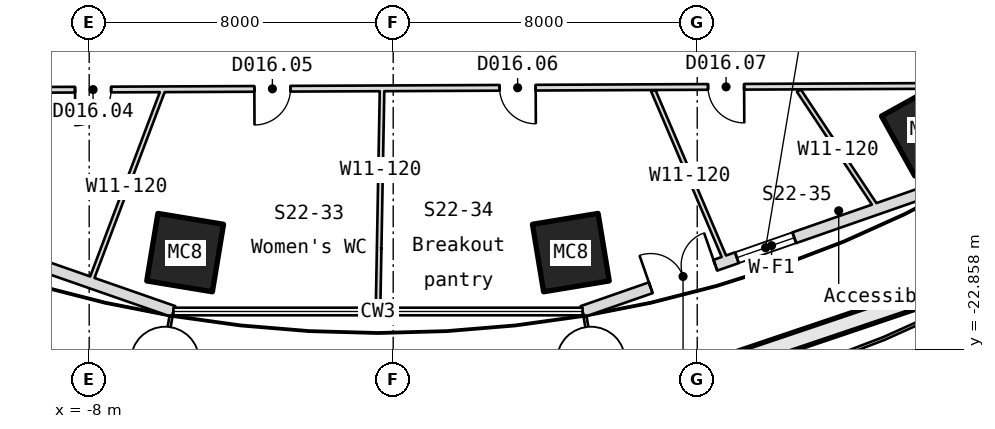
"""IFC4 building model, lengths in metres.
Left out: names, types, materials, properties, quantities, classifications, styles, units other than length and angle.
Written with IfcOpenShell. Run it as: python <this file> out.ifc"""

import sys

from ifc_helpers import new_model, si_unit, direction, frame, frame_2d, origin, origin_2d, place, context, subcontext, project, spatial, rectangle, hollow_rectangle, extrude, element, fill, save


model = new_model("IFC4")
c1 = context("Model", 3, precision=1e-05, world=origin(), true_north=direction((0.0, 1.0)))
c2 = subcontext(c1, "Body", "Model", "MODEL_VIEW")
j1 = project(units=[si_unit("LENGTHUNIT", "METRE"), si_unit("PLANEANGLEUNIT", "RADIAN")], contexts=[c1])
p1 = place(None, origin())
s1 = spatial("IfcSite", under=j1, at=p1, CompositionType="ELEMENT")
p2 = place(p1, origin())
s2 = spatial("IfcBuilding", under=s1, at=p2, CompositionType="ELEMENT")
p3 = place(p2, frame((0.0, 0.0, 321.85)))
s3 = spatial("IfcBuildingStorey", under=s2, at=p3, CompositionType="ELEMENT", Elevation=321.85)
for number, where, z_axis, x_axis in (
    (1, (-5.475, -20.311, -0.18), (0.0, 0.0, 1.0), (-0.987, 0.163, 0.0)),
    (2, (4.675, -20.311, -0.18), (0.0, 0.0, 1.0), (-0.987, -0.163, 0.0)),
    (3, (14.052, -17.082, -0.18), (0.0, 0.0, 1.0), (-0.874, -0.486, 0.0)),
):
    element("IfcColumn", number, at=place(p3, frame(where, z_axis=z_axis, x_axis=x_axis)), inside=s3, PredefinedType="COLUMN", context=c2, shape_type="SweptSolid", body=[
        extrude(hollow_rectangle(XDim=1.75, YDim=1.8, WallThickness=0.055, at=origin_2d()), origin(), (0.0, 0.0, 1.0), 4.15),
    ])
p4 = place(p3, frame((-15.729, -18.396, 0.0), z_axis=(0.0, 0.0, 1.0), x_axis=(0.944334385595, -0.328987185438, 0.0)))
e4 = element("IfcWall", 4, at=p4, inside=s3, PredefinedType="SOLIDWALL", context=c2, shape_type="SweptSolid", body=[
    extrude(rectangle(XDim=10.532, YDim=0.3, at=frame_2d((5.266, 0.0))), origin(), (0.0, 0.0, 1.0), 3.97),
])
p5 = place(p4, frame((1.9, 0.0, 0.0)))
e5 = element("IfcOpeningElement", 5, at=p5, cuts=e4, PredefinedType="OPENING", context=c2, shape_type="SweptSolid", body=[
    extrude(rectangle(XDim=1.8, YDim=2.4, at=frame_2d((0.9, 1.2))), frame((0.0, 0.16, 0.0), z_axis=(0.0, -1.0, 0.0), x_axis=(1.0, 0.0, 0.0)), (0.0, 0.0, 1.0), 0.32),
])
p6 = place(p4, frame((4.3, 0.0, 0.9)))
e6 = element("IfcOpeningElement", 6, at=p6, cuts=e4, PredefinedType="OPENING", context=c2, shape_type="SweptSolid", body=[
    extrude(rectangle(XDim=1.6, YDim=1.5, at=frame_2d((0.8, 0.75))), frame((0.0, 0.16, 0.0), z_axis=(0.0, -1.0, 0.0), x_axis=(1.0, 0.0, 0.0)), (0.0, 0.0, 1.0), 0.32),
])
p7 = place(p3, frame((4.983, -21.861, 0.0), z_axis=(0.0, 0.0, 1.0), x_axis=(0.944334385595, 0.328987185438, 0.0)))
e7 = element("IfcWall", 7, at=p7, inside=s3, PredefinedType="SOLIDWALL", context=c2, shape_type="SweptSolid", body=[
    extrude(rectangle(XDim=10.532, YDim=0.3, at=frame_2d((5.266, 0.0))), origin(), (0.0, 0.0, 1.0), 3.97),
])
p8 = place(p7, frame((1.9, 0.0, 0.0)))
e8 = element("IfcOpeningElement", 8, at=p8, cuts=e7, PredefinedType="OPENING", context=c2, shape_type="SweptSolid", body=[
    extrude(rectangle(XDim=1.8, YDim=2.4, at=frame_2d((0.9, 1.2))), frame((0.0, 0.16, 0.0), z_axis=(0.0, -1.0, 0.0), x_axis=(1.0, 0.0, 0.0)), (0.0, 0.0, 1.0), 0.32),
])
p9 = place(p7, frame((4.3, 0.0, 0.9)))
e9 = element("IfcOpeningElement", 9, at=p9, cuts=e7, PredefinedType="OPENING", context=c2, shape_type="SweptSolid", body=[
    extrude(rectangle(XDim=1.6, YDim=1.5, at=frame_2d((0.8, 0.75))), frame((0.0, 0.16, 0.0), z_axis=(0.0, -1.0, 0.0), x_axis=(1.0, 0.0, 0.0)), (0.0, 0.0, 1.0), 0.32),
])
p10 = place(p3, frame((-6.063, -16.05, 0.0), z_axis=(0.0, 0.0, 1.0), x_axis=(-0.353368021135, -0.935484388774, 0.0)))
e10 = element("IfcWall", 10, at=p10, inside=s3, PredefinedType="PARTITIONING", context=c2, shape_type="SweptSolid", body=[
    extrude(rectangle(XDim=5.397, YDim=0.12, at=frame_2d((2.699, 0.0))), origin(), (0.0, 0.0, 1.0), 3.97),
])
p11 = place(p3, frame((-0.294, -16.05, 0.0), z_axis=(0.0, 0.0, 1.0), x_axis=(-0.018266352088, -0.999833156272, 0.0)))
e11 = element("IfcWall", 11, at=p11, inside=s3, PredefinedType="PARTITIONING", context=c2, shape_type="SweptSolid", body=[
    extrude(rectangle(XDim=4.157, YDim=0.12, at=frame_2d((2.078, 0.0))), origin(), (0.0, 0.0, 1.0), 3.66),
])
p12 = place(p3, frame((-0.37, -20.206, 0.0), z_axis=(0.0, 0.0, 1.0), x_axis=(-0.018288724099, -0.999832747299, 0.0)))
e12 = element("IfcWall", 12, at=p12, inside=s3, PredefinedType="PARTITIONING", context=c2, shape_type="SweptSolid", body=[
    extrude(rectangle(XDim=1.655, YDim=0.12, at=frame_2d((0.828, 0.0))), origin(), (0.0, 0.0, 1.0), 3.97),
])
p13 = place(p3, frame((6.844, -16.05, 0.0), z_axis=(0.0, 0.0, 1.0), x_axis=(0.392236363269, -0.919864465739, 0.0)))
e13 = element("IfcWall", 13, at=p13, inside=s3, PredefinedType="PARTITIONING", context=c2, shape_type="SweptSolid", body=[
    extrude(rectangle(XDim=4.887, YDim=0.12, at=frame_2d((2.443, 0.0))), origin(), (0.0, 0.0, 1.0), 3.97),
])
p14 = place(p3, frame((10.675, -16.05, 0.0), z_axis=(0.0, 0.0, 1.0), x_axis=(0.553809323765, -0.832643520908, 0.0)))
e14 = element("IfcWall", 14, at=p14, inside=s3, PredefinedType="PARTITIONING", context=c2, shape_type="SweptSolid", body=[
    extrude(rectangle(XDim=3.733, YDim=0.12, at=frame_2d((1.866, 0.0))), origin(), (0.0, 0.0, 1.0), 3.97),
])
p15 = place(p3, frame((14.176, -15.926, 0.0), z_axis=(0.0, 0.0, 1.0), x_axis=(-0.99999052853, -0.004352338421, 0.0)))
e15 = element("IfcWall", 15, at=p15, inside=s3, PredefinedType="PARTITIONING", context=c2, shape_type="SweptSolid", body=[
    extrude(rectangle(XDim=28.44, YDim=0.15, at=frame_2d((14.22, 0.0))), origin(), (0.0, 0.0, 1.0), 3.97),
])
p16 = place(p15, frame((21.599, 0.0, 0.0)))
e16 = element("IfcOpeningElement", 16, at=p16, cuts=e15, PredefinedType="OPENING", context=c2, shape_type="SweptSolid", body=[
    extrude(rectangle(XDim=0.95, YDim=2.1, at=frame_2d((0.475, 1.05))), frame((0.0, 0.085, 0.0), z_axis=(0.0, -1.0, 0.0), x_axis=(1.0, 0.0, 0.0)), (0.0, 0.0, 1.0), 0.17),
])
p17 = place(p15, frame((16.88, 0.0, 0.0)))
e17 = element("IfcOpeningElement", 17, at=p17, cuts=e15, PredefinedType="OPENING", context=c2, shape_type="SweptSolid", body=[
    extrude(rectangle(XDim=0.95, YDim=2.1, at=frame_2d((0.475, 1.05))), frame((0.0, 0.085, 0.0), z_axis=(0.0, -1.0, 0.0), x_axis=(1.0, 0.0, 0.0)), (0.0, 0.0, 1.0), 0.17),
])
p18 = place(p15, frame((10.427, 0.0, 0.0)))
e18 = element("IfcOpeningElement", 18, at=p18, cuts=e15, PredefinedType="OPENING", context=c2, shape_type="SweptSolid", body=[
    extrude(rectangle(XDim=0.95, YDim=2.1, at=frame_2d((0.475, 1.05))), frame((0.0, 0.085, 0.0), z_axis=(0.0, -1.0, 0.0), x_axis=(1.0, 0.0, 0.0)), (0.0, 0.0, 1.0), 0.17),
])
p19 = place(p15, frame((4.942, 0.0, 0.0)))
e19 = element("IfcOpeningElement", 19, at=p19, cuts=e15, PredefinedType="OPENING", context=c2, shape_type="SweptSolid", body=[
    extrude(rectangle(XDim=0.95, YDim=2.1, at=frame_2d((0.475, 1.05))), frame((0.0, 0.085, 0.0), z_axis=(0.0, -1.0, 0.0), x_axis=(1.0, 0.0, 0.0)), (0.0, 0.0, 1.0), 0.17),
])
p20 = place(p8, origin())
e20 = element("IfcDoor", 20, at=p20, inside=s3, OperationType="SINGLE_SWING_LEFT", PredefinedType="DOOR", context=c2, shape_type="SweptSolid", body=[
    extrude(rectangle(XDim=1.8, YDim=2.4, at=frame_2d((0.9, 1.2))), frame((0.0, 0.025, 0.0), z_axis=(0.0, -1.0, 0.0), x_axis=(1.0, 0.0, 0.0)), (0.0, 0.0, 1.0), 0.05),
])
fill(e8, e20)
p21 = place(p9, origin())
e21 = element("IfcWindow", 21, at=p21, inside=s3, PartitioningType="SINGLE_PANEL", PredefinedType="WINDOW", context=c2, shape_type="SweptSolid", body=[
    extrude(rectangle(XDim=1.6, YDim=1.5, at=frame_2d((0.8, 0.75))), frame((0.0, 0.03, 0.0), z_axis=(0.0, -1.0, 0.0), x_axis=(1.0, 0.0, 0.0)), (0.0, 0.0, 1.0), 0.06),
])
fill(e9, e21)
p22 = place(p16, origin())
e22 = element("IfcDoor", 22, at=p22, inside=s3, OperationType="SINGLE_SWING_RIGHT", PredefinedType="DOOR", context=c2, shape_type="SweptSolid", body=[
    extrude(rectangle(XDim=0.95, YDim=2.1, at=frame_2d((0.475, 1.05))), frame((0.0, 0.025, 0.0), z_axis=(0.0, -1.0, 0.0), x_axis=(1.0, 0.0, 0.0)), (0.0, 0.0, 1.0), 0.05),
])
fill(e16, e22)
p23 = place(p17, origin())
e23 = element("IfcDoor", 23, at=p23, inside=s3, OperationType="SINGLE_SWING_RIGHT", PredefinedType="DOOR", context=c2, shape_type="SweptSolid", body=[
    extrude(rectangle(XDim=0.95, YDim=2.1, at=frame_2d((0.475, 1.05))), frame((0.0, 0.025, 0.0), z_axis=(0.0, -1.0, 0.0), x_axis=(1.0, 0.0, 0.0)), (0.0, 0.0, 1.0), 0.05),
])
fill(e17, e23)
p24 = place(p18, origin())
e24 = element("IfcDoor", 24, at=p24, inside=s3, OperationType="SINGLE_SWING_RIGHT", PredefinedType="DOOR", context=c2, shape_type="SweptSolid", body=[
    extrude(rectangle(XDim=0.95, YDim=2.1, at=frame_2d((0.475, 1.05))), frame((0.0, 0.025, 0.0), z_axis=(0.0, -1.0, 0.0), x_axis=(1.0, 0.0, 0.0)), (0.0, 0.0, 1.0), 0.05),
])
fill(e18, e24)
p25 = place(p19, origin())
e25 = element("IfcDoor", 25, at=p25, inside=s3, OperationType="SINGLE_SWING_RIGHT", PredefinedType="DOOR", context=c2, shape_type="SweptSolid", body=[
    extrude(rectangle(XDim=0.95, YDim=2.1, at=frame_2d((0.475, 1.05))), frame((0.0, 0.025, 0.0), z_axis=(0.0, -1.0, 0.0), x_axis=(1.0, 0.0, 0.0)), (0.0, 0.0, 1.0), 0.05),
])
fill(e19, e25)
save(model, sys.argv[1])
